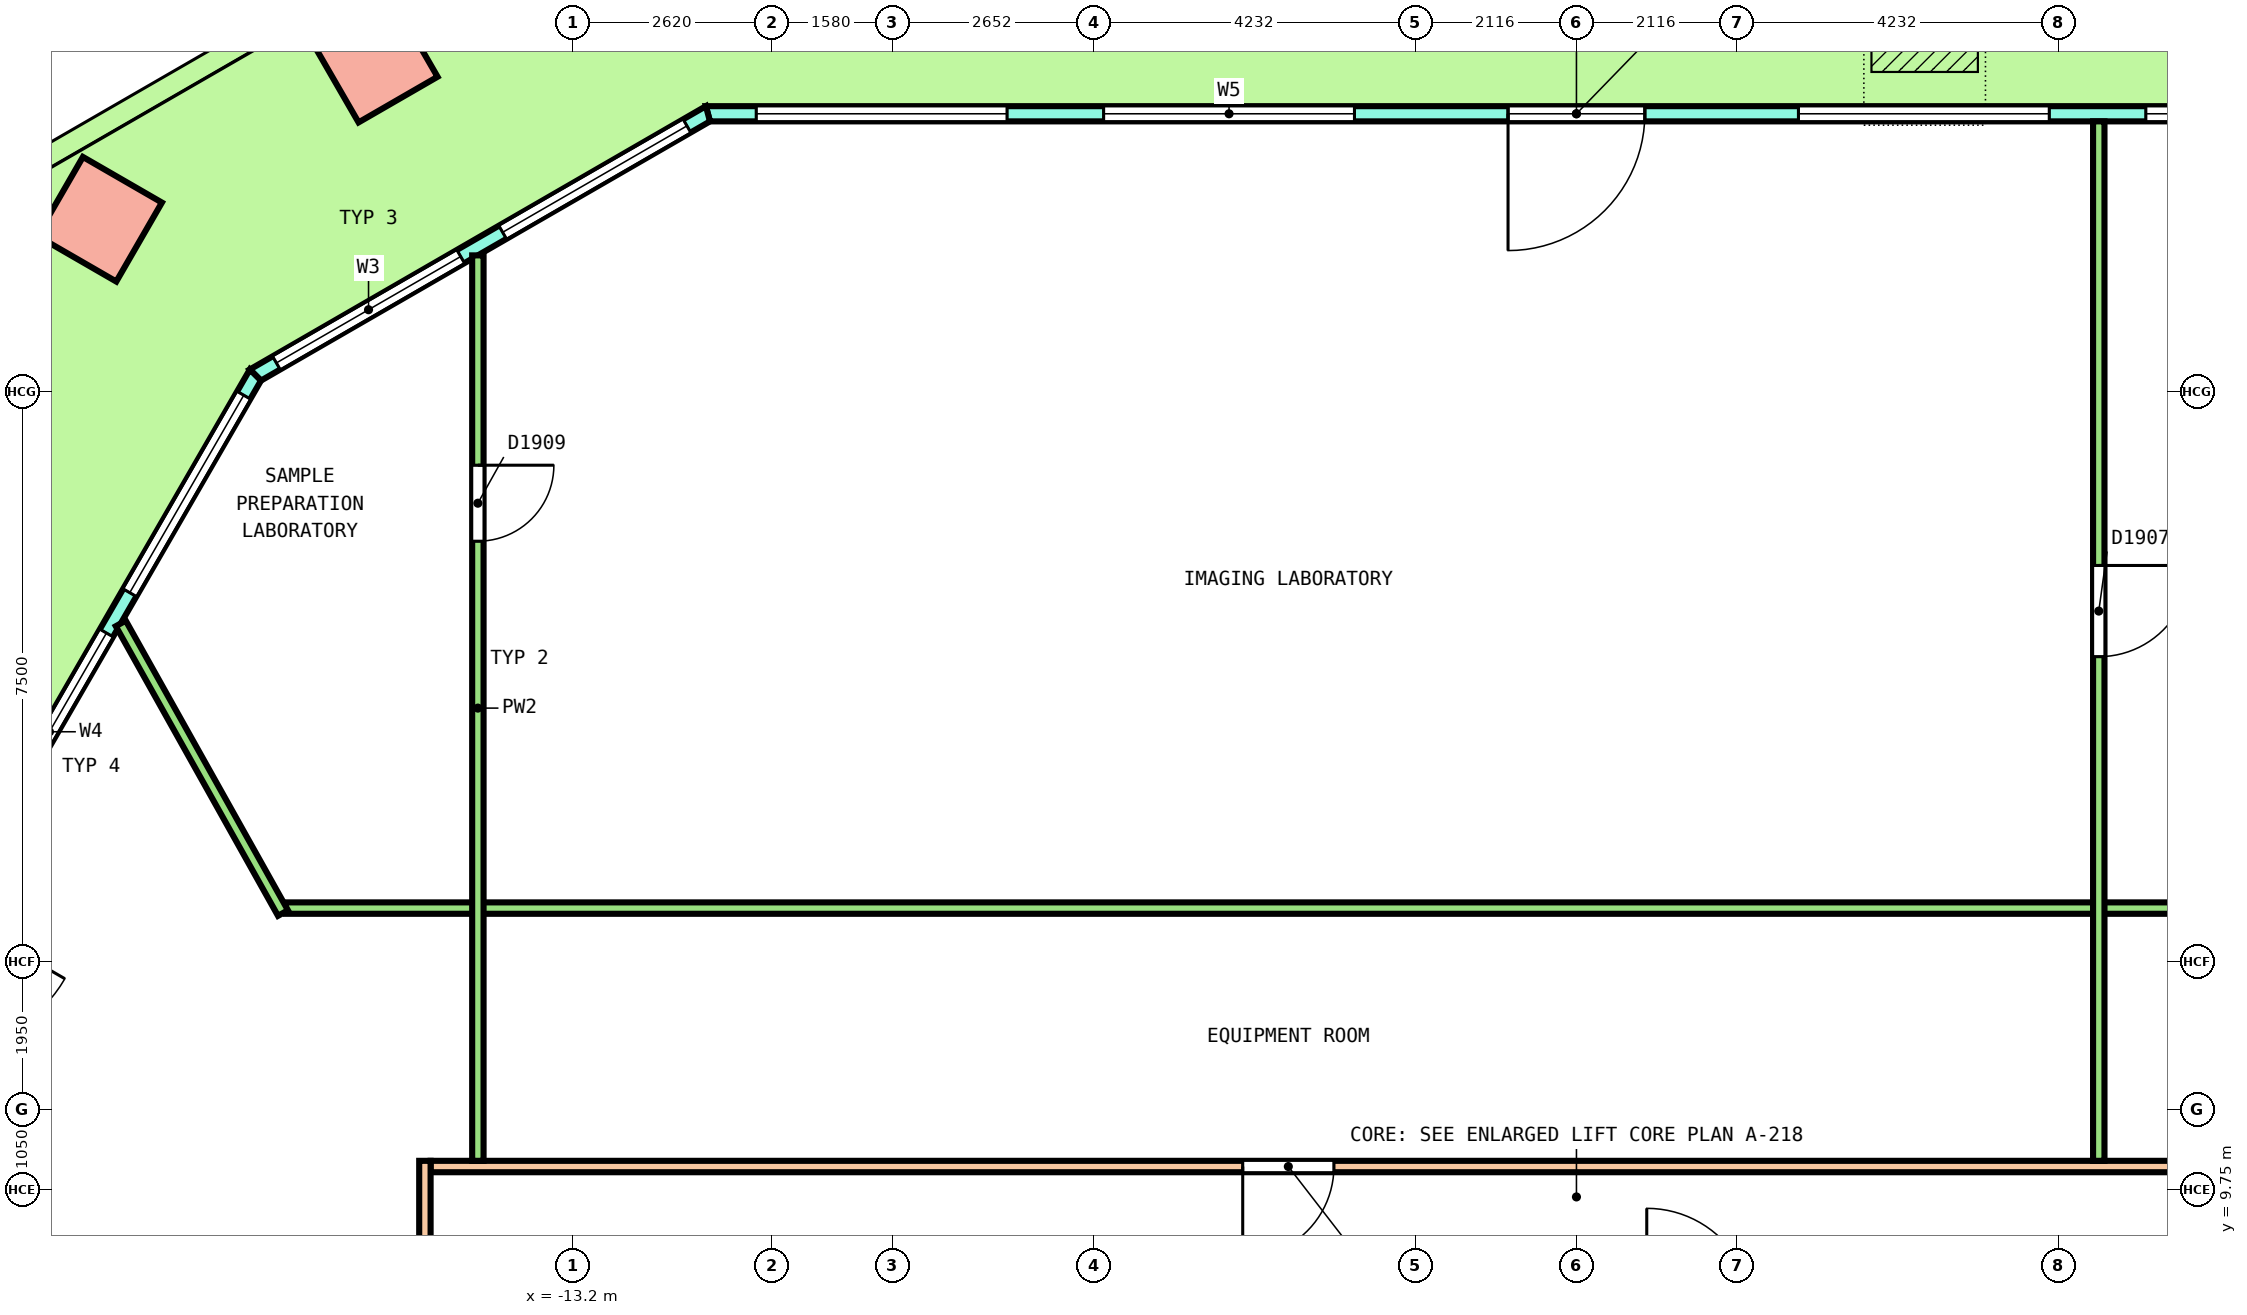
"""IFC4 building model, lengths in metres.
Left out: names, types, materials, properties, quantities, classifications, styles, units other than length and angle.
Written with IfcOpenShell. Run it as: python <this file> out.ifc"""

import sys

from ifc_helpers import new_model, si_unit, direction, frame, frame_2d, origin, origin_2d, place, context, subcontext, project, spatial, polyline, rectangle, outline, extrude, element, fill, save


model = new_model("IFC4")
c1 = context("Model", 3, precision=1e-05, world=origin(), true_north=direction((0.0, 1.0)))
c2 = subcontext(c1, "Body", "Model", "MODEL_VIEW")
j1 = project(units=[si_unit("LENGTHUNIT", "METRE"), si_unit("PLANEANGLEUNIT", "RADIAN")], contexts=[c1])
p1 = place(None, origin())
s1 = spatial("IfcSite", under=j1, at=p1, CompositionType="ELEMENT")
p2 = place(p1, origin())
s2 = spatial("IfcBuilding", under=s1, at=p2, CompositionType="ELEMENT")
p3 = place(p2, frame((0.0, 0.0, 193.6)))
s3 = spatial("IfcBuildingStorey", under=s2, at=p3, CompositionType="ELEMENT", Elevation=193.6)
for number, where, z_axis, x_axis in (
    (1, (-15.803, 24.606, 0.0), (0.0, 0.0, 1.0), (-0.866, -0.5, 0.0)),
    (2, (-19.43, 22.512, 0.0), (0.0, 0.0, 1.0), (-0.5, -0.866, 0.0)),
):
    element("IfcColumn", number, at=place(p3, frame(where, z_axis=z_axis, x_axis=x_axis)), inside=s3, PredefinedType="COLUMN", context=c2, shape_type="SweptSolid", body=[
        extrude(rectangle(XDim=1.2, YDim=1.2, at=origin_2d()), origin(), (0.0, 0.0, 1.0), 4.04),
    ])
p4 = place(p3, frame((11.426, 23.9, 0.0), z_axis=(0.0, 0.0, 1.0), x_axis=(-1.0, 0.0, 0.0)))
e3 = element("IfcWall", 3, at=p4, inside=s3, PredefinedType="SOLIDWALL", context=c2, shape_type="SweptSolid", body=[
    extrude(outline(polyline([(-0.027, -0.1), (1.014, -0.1), (2.055, -0.1), (3.097, -0.1), (4.138, -0.1), (5.179, -0.1), (6.22, -0.1), (7.261, -0.1), (8.303, -0.1), (9.344, -0.1), (10.385, -0.1), (11.426, -0.1), (12.468, -0.1), (13.509, -0.1), (14.55, -0.1), (15.591, -0.1), (16.632, -0.1), (17.673, -0.1), (18.715, -0.1), (19.756, -0.1), (20.797, -0.1), (21.838, -0.1), (22.879, -0.1), (22.826, 0.1), (21.789, 0.1), (20.753, 0.1), (19.717, 0.1), (18.68, 0.1), (17.644, 0.1), (16.608, 0.1), (15.572, 0.1), (14.535, 0.1), (13.499, 0.1), (12.463, 0.1), (11.426, 0.1), (10.39, 0.1), (9.354, 0.1), (8.317, 0.1), (7.281, 0.1), (6.245, 0.1), (5.208, 0.1), (4.172, 0.1), (3.136, 0.1), (2.099, 0.1), (1.063, 0.1), (0.027, 0.1), (-0.027, -0.1)])), origin(), (0.0, 0.0, 1.0), 4.1),
])
p5 = place(p4, frame((0.635, 0.0, 0.1)))
e4 = element("IfcOpeningElement", 4, at=p5, cuts=e3, PredefinedType="OPENING", context=c2, shape_type="SweptSolid", body=[
    extrude(rectangle(XDim=3.3, YDim=2.9, at=frame_2d((1.65, 1.45))), frame((0.0, 0.11, 0.0), z_axis=(0.0, -1.0, 0.0), x_axis=(1.0, 0.0, 0.0)), (0.0, 0.0, 1.0), 0.22),
])
p6 = place(p4, frame((5.206, 0.0, 0.1)))
e5 = element("IfcOpeningElement", 5, at=p6, cuts=e3, PredefinedType="OPENING", context=c2, shape_type="SweptSolid", body=[
    extrude(rectangle(XDim=3.3, YDim=2.9, at=frame_2d((1.65, 1.45))), frame((0.0, 0.11, 0.0), z_axis=(0.0, -1.0, 0.0), x_axis=(1.0, 0.0, 0.0)), (0.0, 0.0, 1.0), 0.22),
])
p7 = place(p4, frame((10.526, 0.0, 0.0)))
e6 = element("IfcOpeningElement", 6, at=p7, cuts=e3, PredefinedType="OPENING", context=c2, shape_type="SweptSolid", body=[
    extrude(rectangle(XDim=1.8, YDim=2.4, at=frame_2d((0.9, 1.2))), frame((0.0, 0.11, 0.0), z_axis=(0.0, -1.0, 0.0), x_axis=(1.0, 0.0, 0.0)), (0.0, 0.0, 1.0), 0.22),
])
p8 = place(p4, frame((10.526, 0.0, 2.55)))
e7 = element("IfcOpeningElement", 7, at=p8, cuts=e3, PredefinedType="OPENING", context=c2, shape_type="SweptSolid", body=[
    extrude(rectangle(XDim=1.8, YDim=0.45, at=frame_2d((0.9, 0.225))), frame((0.0, 0.11, 0.0), z_axis=(0.0, -1.0, 0.0), x_axis=(1.0, 0.0, 0.0)), (0.0, 0.0, 1.0), 0.22),
])
p9 = place(p4, frame((14.347, 0.0, 0.1)))
e8 = element("IfcOpeningElement", 8, at=p9, cuts=e3, PredefinedType="OPENING", context=c2, shape_type="SweptSolid", body=[
    extrude(rectangle(XDim=3.3, YDim=2.9, at=frame_2d((1.65, 1.45))), frame((0.0, 0.11, 0.0), z_axis=(0.0, -1.0, 0.0), x_axis=(1.0, 0.0, 0.0)), (0.0, 0.0, 1.0), 0.22),
])
p10 = place(p4, frame((18.917, 0.0, 0.1)))
e9 = element("IfcOpeningElement", 9, at=p10, cuts=e3, PredefinedType="OPENING", context=c2, shape_type="SweptSolid", body=[
    extrude(rectangle(XDim=3.3, YDim=2.9, at=frame_2d((1.65, 1.45))), frame((0.0, 0.11, 0.0), z_axis=(0.0, -1.0, 0.0), x_axis=(1.0, 0.0, 0.0)), (0.0, 0.0, 1.0), 0.22),
])
p11 = place(p3, frame((-11.426, 23.9, 0.0), z_axis=(0.0, 0.0, 1.0), x_axis=(-0.866029458321, -0.49999297727, 0.0)))
e10 = element("IfcWall", 10, at=p11, inside=s3, PredefinedType="SOLIDWALL", context=c2, shape_type="SweptSolid", body=[
    extrude(outline(polyline([(-0.027, -0.1), (1.128, -0.1), (2.282, -0.1), (3.437, -0.1), (4.592, -0.1), (5.747, -0.1), (6.901, -0.1), (6.848, 0.1), (5.711, 0.1), (4.574, 0.1), (3.437, 0.1), (2.301, 0.1), (1.164, 0.1), (0.027, 0.1), (-0.027, -0.1)])), origin(), (0.0, 0.0, 1.0), 4.1),
])
p12 = place(p11, frame((0.319, 0.0, 0.1)))
e11 = element("IfcOpeningElement", 11, at=p12, cuts=e10, PredefinedType="OPENING", context=c2, shape_type="SweptSolid", body=[
    extrude(rectangle(XDim=2.8, YDim=2.9, at=frame_2d((1.4, 1.45))), frame((0.0, 0.11, 0.0), z_axis=(0.0, -1.0, 0.0), x_axis=(1.0, 0.0, 0.0)), (0.0, 0.0, 1.0), 0.22),
])
p13 = place(p11, frame((3.756, 0.0, 0.1)))
e12 = element("IfcOpeningElement", 12, at=p13, cuts=e10, PredefinedType="OPENING", context=c2, shape_type="SweptSolid", body=[
    extrude(rectangle(XDim=2.8, YDim=2.9, at=frame_2d((1.4, 1.45))), frame((0.0, 0.11, 0.0), z_axis=(0.0, -1.0, 0.0), x_axis=(1.0, 0.0, 0.0)), (0.0, 0.0, 1.0), 0.22),
])
p14 = place(p3, frame((-17.38, 20.463, 0.0), z_axis=(0.0, 0.0, 1.0), x_axis=(-0.500000137386, -0.866025324465, 0.0)))
e13 = element("IfcWall", 13, at=p14, inside=s3, PredefinedType="SOLIDWALL", context=c2, shape_type="SweptSolid", body=[
    extrude(outline(polyline([(-0.027, -0.1), (0.979, -0.1), (1.986, -0.1), (2.992, -0.1), (3.999, -0.1), (5.005, -0.1), (6.012, -0.1), (7.018, -0.1), (8.025, -0.1), (9.031, -0.1), (10.038, -0.1), (11.044, -0.1), (12.051, -0.1), (13.057, -0.1), (14.063, -0.1), (15.07, -0.1), (16.076, -0.1), (17.083, -0.1), (18.089, -0.1), (18.036, 0.1), (17.035, 0.1), (16.035, 0.1), (15.034, 0.1), (14.034, 0.1), (13.033, 0.1), (12.033, 0.1), (11.032, 0.1), (10.032, 0.1), (9.031, 0.1), (8.031, 0.1), (7.03, 0.1), (6.03, 0.1), (5.029, 0.1), (4.029, 0.1), (3.028, 0.1), (2.028, 0.1), (1.027, 0.1), (0.027, 0.1), (-0.027, -0.1)])), origin(), (0.0, 0.0, 1.0), 4.1),
])
p15 = place(p14, frame((0.306, 0.0, 0.1)))
e14 = element("IfcOpeningElement", 14, at=p15, cuts=e13, PredefinedType="OPENING", context=c2, shape_type="SweptSolid", body=[
    extrude(rectangle(XDim=3.0, YDim=2.9, at=frame_2d((1.5, 1.45))), frame((0.0, 0.11, 0.0), z_axis=(0.0, -1.0, 0.0), x_axis=(1.0, 0.0, 0.0)), (0.0, 0.0, 1.0), 0.22),
])
p16 = place(p14, frame((3.919, 0.0, 0.1)))
e15 = element("IfcOpeningElement", 15, at=p16, cuts=e13, PredefinedType="OPENING", context=c2, shape_type="SweptSolid", body=[
    extrude(rectangle(XDim=3.0, YDim=2.9, at=frame_2d((1.5, 1.45))), frame((0.0, 0.11, 0.0), z_axis=(0.0, -1.0, 0.0), x_axis=(1.0, 0.0, 0.0)), (0.0, 0.0, 1.0), 0.22),
])
p17 = place(p14, frame((8.131, 0.0, 0.0)))
e16 = element("IfcOpeningElement", 16, at=p17, cuts=e13, PredefinedType="OPENING", context=c2, shape_type="SweptSolid", body=[
    extrude(rectangle(XDim=1.8, YDim=2.4, at=frame_2d((0.9, 1.2))), frame((0.0, 0.11, 0.0), z_axis=(0.0, -1.0, 0.0), x_axis=(1.0, 0.0, 0.0)), (0.0, 0.0, 1.0), 0.22),
])
p18 = place(p14, frame((8.131, 0.0, 2.55)))
e17 = element("IfcOpeningElement", 17, at=p18, cuts=e13, PredefinedType="OPENING", context=c2, shape_type="SweptSolid", body=[
    extrude(rectangle(XDim=1.8, YDim=0.45, at=frame_2d((0.9, 0.225))), frame((0.0, 0.11, 0.0), z_axis=(0.0, -1.0, 0.0), x_axis=(1.0, 0.0, 0.0)), (0.0, 0.0, 1.0), 0.22),
])
p19 = place(p14, frame((11.144, 0.0, 0.1)))
e18 = element("IfcOpeningElement", 18, at=p19, cuts=e13, PredefinedType="OPENING", context=c2, shape_type="SweptSolid", body=[
    extrude(rectangle(XDim=3.0, YDim=2.9, at=frame_2d((1.5, 1.45))), frame((0.0, 0.11, 0.0), z_axis=(0.0, -1.0, 0.0), x_axis=(1.0, 0.0, 0.0)), (0.0, 0.0, 1.0), 0.22),
])
p20 = place(p14, frame((14.756, 0.0, 0.1)))
e19 = element("IfcOpeningElement", 19, at=p20, cuts=e13, PredefinedType="OPENING", context=c2, shape_type="SweptSolid", body=[
    extrude(rectangle(XDim=3.0, YDim=2.9, at=frame_2d((1.5, 1.45))), frame((0.0, 0.11, 0.0), z_axis=(0.0, -1.0, 0.0), x_axis=(1.0, 0.0, 0.0)), (0.0, 0.0, 1.0), 0.22),
])
p21 = place(p3, frame((-15.075, 10.05, 0.0), z_axis=(0.0, 0.0, 1.0), x_axis=(1.0, 0.0, 0.0)))
e20 = element("IfcWall", 20, at=p21, inside=s3, PredefinedType="PARTITIONING", context=c2, shape_type="SweptSolid", body=[
    extrude(rectangle(XDim=30.15, YDim=0.15, at=frame_2d((15.075, 0.0))), origin(), (0.0, 0.0, 1.0), 3.05),
])
p22 = place(p21, frame((26.573, 0.0, 0.0)))
e21 = element("IfcOpeningElement", 21, at=p22, cuts=e20, PredefinedType="OPENING", context=c2, shape_type="SweptSolid", body=[
    extrude(rectangle(XDim=1.0, YDim=2.1, at=frame_2d((0.5, 1.05))), frame((0.0, 0.085, 0.0), z_axis=(0.0, -1.0, 0.0), x_axis=(1.0, 0.0, 0.0)), (0.0, 0.0, 1.0), 0.17),
])
p23 = place(p21, frame((10.684, 0.0, 0.0)))
e22 = element("IfcOpeningElement", 22, at=p23, cuts=e20, PredefinedType="OPENING", context=c2, shape_type="SweptSolid", body=[
    extrude(rectangle(XDim=1.2, YDim=2.1, at=frame_2d((0.6, 1.05))), frame((0.0, 0.085, 0.0), z_axis=(0.0, -1.0, 0.0), x_axis=(1.0, 0.0, 0.0)), (0.0, 0.0, 1.0), 0.17),
])
p24 = place(p3, frame((-15.15, 0.576, 0.0), z_axis=(0.0, 0.0, 1.0), x_axis=(0.0, 1.0, 0.0)))
e23 = element("IfcWall", 23, at=p24, inside=s3, PredefinedType="PARTITIONING", context=c2, shape_type="SweptSolid", body=[
    extrude(rectangle(XDim=9.549, YDim=0.15, at=frame_2d((4.775, 0.0))), origin(), (0.0, 0.0, 1.0), 3.05),
])
p25 = place(p3, frame((-16.979, 13.45, 0.0), z_axis=(0.0, 0.0, 1.0), x_axis=(1.0, 0.0, 0.0)))
e24 = element("IfcWall", 24, at=p25, inside=s3, PredefinedType="PARTITIONING", context=c2, shape_type="SweptSolid", body=[
    extrude(rectangle(XDim=35.454, YDim=0.15, at=frame_2d((17.727, 0.0))), origin(), (0.0, 0.0, 1.0), 3.05),
])
p26 = place(p25, frame((27.623, 0.0, 0.0)))
e25 = element("IfcOpeningElement", 25, at=p26, cuts=e24, PredefinedType="OPENING", context=c2, shape_type="SweptSolid", body=[
    extrude(rectangle(XDim=1.2, YDim=2.1, at=frame_2d((0.6, 1.05))), frame((0.0, 0.085, 0.0), z_axis=(0.0, -1.0, 0.0), x_axis=(1.0, 0.0, 0.0)), (0.0, 0.0, 1.0), 0.17),
])
p27 = place(p3, frame((6.872, 10.125, 0.0), z_axis=(0.0, 0.0, 1.0), x_axis=(0.0, 1.0, 0.0)))
e26 = element("IfcWall", 26, at=p27, inside=s3, PredefinedType="PARTITIONING", context=c2, shape_type="SweptSolid", body=[
    extrude(rectangle(XDim=13.675, YDim=0.15, at=frame_2d((6.837, 0.0))), origin(), (0.0, 0.0, 1.0), 3.05),
])
p28 = place(p27, frame((6.633, 0.0, 0.0)))
e27 = element("IfcOpeningElement", 27, at=p28, cuts=e26, PredefinedType="OPENING", context=c2, shape_type="SweptSolid", body=[
    extrude(rectangle(XDim=1.2, YDim=2.1, at=frame_2d((0.6, 1.05))), frame((0.0, 0.085, 0.0), z_axis=(0.0, -1.0, 0.0), x_axis=(1.0, 0.0, 0.0)), (0.0, 0.0, 1.0), 0.17),
])
p29 = place(p3, frame((-14.453, 10.125, 0.0), z_axis=(0.0, 0.0, 1.0), x_axis=(0.0, 1.0, 0.0)))
e28 = element("IfcWall", 28, at=p29, inside=s3, PredefinedType="PARTITIONING", context=c2, shape_type="SweptSolid", body=[
    extrude(rectangle(XDim=11.912, YDim=0.15, at=frame_2d((5.956, 0.0))), origin(), (0.0, 0.0, 1.0), 3.05),
])
p30 = place(p29, frame((8.152, 0.0, 0.0)))
e29 = element("IfcOpeningElement", 29, at=p30, cuts=e28, PredefinedType="OPENING", context=c2, shape_type="SweptSolid", body=[
    extrude(rectangle(XDim=1.0, YDim=2.1, at=frame_2d((0.5, 1.05))), frame((0.0, 0.085, 0.0), z_axis=(0.0, -1.0, 0.0), x_axis=(1.0, 0.0, 0.0)), (0.0, 0.0, 1.0), 0.17),
])
p31 = place(p3, frame((-19.151, 17.195, 0.0), z_axis=(0.0, 0.0, 1.0), x_axis=(0.48858294178, -0.872517454841, 0.0)))
e30 = element("IfcWall", 30, at=p31, inside=s3, PredefinedType="PARTITIONING", context=c2, shape_type="SweptSolid", body=[
    extrude(rectangle(XDim=4.367, YDim=0.15, at=frame_2d((2.184, 0.0))), origin(), (0.0, 0.0, 1.0), 3.05),
])
p32 = place(p5, origin())
e31 = element("IfcWindow", 31, at=p32, inside=s3, PartitioningType="SINGLE_PANEL", PredefinedType="WINDOW", context=c2, shape_type="SweptSolid", body=[
    extrude(rectangle(XDim=3.3, YDim=2.9, at=frame_2d((1.65, 1.45))), frame((0.0, 0.03, 0.0), z_axis=(0.0, -1.0, 0.0), x_axis=(1.0, 0.0, 0.0)), (0.0, 0.0, 1.0), 0.06),
])
fill(e4, e31)
p33 = place(p6, origin())
e32 = element("IfcWindow", 32, at=p33, inside=s3, PartitioningType="SINGLE_PANEL", PredefinedType="WINDOW", context=c2, shape_type="SweptSolid", body=[
    extrude(rectangle(XDim=3.3, YDim=2.9, at=frame_2d((1.65, 1.45))), frame((0.0, 0.03, 0.0), z_axis=(0.0, -1.0, 0.0), x_axis=(1.0, 0.0, 0.0)), (0.0, 0.0, 1.0), 0.06),
])
fill(e5, e32)
p34 = place(p7, origin())
e33 = element("IfcDoor", 33, at=p34, inside=s3, OperationType="DOUBLE_DOOR_SINGLE_SWING", PredefinedType="DOOR", context=c2, shape_type="SweptSolid", body=[
    extrude(rectangle(XDim=1.8, YDim=2.4, at=frame_2d((0.9, 1.2))), frame((0.0, 0.025, 0.0), z_axis=(0.0, -1.0, 0.0), x_axis=(1.0, 0.0, 0.0)), (0.0, 0.0, 1.0), 0.05),
])
fill(e6, e33)
p35 = place(p8, origin())
e34 = element("IfcWindow", 34, at=p35, inside=s3, PartitioningType="SINGLE_PANEL", PredefinedType="WINDOW", context=c2, shape_type="SweptSolid", body=[
    extrude(rectangle(XDim=1.8, YDim=0.45, at=frame_2d((0.9, 0.225))), frame((0.0, 0.03, 0.0), z_axis=(0.0, -1.0, 0.0), x_axis=(1.0, 0.0, 0.0)), (0.0, 0.0, 1.0), 0.06),
])
fill(e7, e34)
p36 = place(p9, origin())
e35 = element("IfcWindow", 35, at=p36, inside=s3, PartitioningType="SINGLE_PANEL", PredefinedType="WINDOW", context=c2, shape_type="SweptSolid", body=[
    extrude(rectangle(XDim=3.3, YDim=2.9, at=frame_2d((1.65, 1.45))), frame((0.0, 0.03, 0.0), z_axis=(0.0, -1.0, 0.0), x_axis=(1.0, 0.0, 0.0)), (0.0, 0.0, 1.0), 0.06),
])
fill(e8, e35)
p37 = place(p10, origin())
e36 = element("IfcWindow", 36, at=p37, inside=s3, PartitioningType="SINGLE_PANEL", PredefinedType="WINDOW", context=c2, shape_type="SweptSolid", body=[
    extrude(rectangle(XDim=3.3, YDim=2.9, at=frame_2d((1.65, 1.45))), frame((0.0, 0.03, 0.0), z_axis=(0.0, -1.0, 0.0), x_axis=(1.0, 0.0, 0.0)), (0.0, 0.0, 1.0), 0.06),
])
fill(e9, e36)
p38 = place(p12, origin())
e37 = element("IfcWindow", 37, at=p38, inside=s3, PartitioningType="SINGLE_PANEL", PredefinedType="WINDOW", context=c2, shape_type="SweptSolid", body=[
    extrude(rectangle(XDim=2.8, YDim=2.9, at=frame_2d((1.4, 1.45))), frame((0.0, 0.03, 0.0), z_axis=(0.0, -1.0, 0.0), x_axis=(1.0, 0.0, 0.0)), (0.0, 0.0, 1.0), 0.06),
])
fill(e11, e37)
p39 = place(p13, origin())
e38 = element("IfcWindow", 38, at=p39, inside=s3, PartitioningType="SINGLE_PANEL", PredefinedType="WINDOW", context=c2, shape_type="SweptSolid", body=[
    extrude(rectangle(XDim=2.8, YDim=2.9, at=frame_2d((1.4, 1.45))), frame((0.0, 0.03, 0.0), z_axis=(0.0, -1.0, 0.0), x_axis=(1.0, 0.0, 0.0)), (0.0, 0.0, 1.0), 0.06),
])
fill(e12, e38)
p40 = place(p15, origin())
e39 = element("IfcWindow", 39, at=p40, inside=s3, PartitioningType="SINGLE_PANEL", PredefinedType="WINDOW", context=c2, shape_type="SweptSolid", body=[
    extrude(rectangle(XDim=3.0, YDim=2.9, at=frame_2d((1.5, 1.45))), frame((0.0, 0.03, 0.0), z_axis=(0.0, -1.0, 0.0), x_axis=(1.0, 0.0, 0.0)), (0.0, 0.0, 1.0), 0.06),
])
fill(e14, e39)
p41 = place(p16, origin())
e40 = element("IfcWindow", 40, at=p41, inside=s3, PartitioningType="SINGLE_PANEL", PredefinedType="WINDOW", context=c2, shape_type="SweptSolid", body=[
    extrude(rectangle(XDim=3.0, YDim=2.9, at=frame_2d((1.5, 1.45))), frame((0.0, 0.03, 0.0), z_axis=(0.0, -1.0, 0.0), x_axis=(1.0, 0.0, 0.0)), (0.0, 0.0, 1.0), 0.06),
])
fill(e15, e40)
p42 = place(p28, origin())
e41 = element("IfcDoor", 41, at=p42, inside=s3, OperationType="DOUBLE_DOOR_SINGLE_SWING", PredefinedType="DOOR", context=c2, shape_type="SweptSolid", body=[
    extrude(rectangle(XDim=1.2, YDim=2.1, at=frame_2d((0.6, 1.05))), frame((0.0, 0.025, 0.0), z_axis=(0.0, -1.0, 0.0), x_axis=(1.0, 0.0, 0.0)), (0.0, 0.0, 1.0), 0.05),
])
fill(e27, e41)
p43 = place(p23, origin())
e42 = element("IfcDoor", 42, at=p43, inside=s3, OperationType="DOUBLE_DOOR_SINGLE_SWING", PredefinedType="DOOR", context=c2, shape_type="SweptSolid", body=[
    extrude(rectangle(XDim=1.2, YDim=2.1, at=frame_2d((0.6, 1.05))), frame((0.0, 0.025, 0.0), z_axis=(0.0, -1.0, 0.0), x_axis=(1.0, 0.0, 0.0)), (0.0, 0.0, 1.0), 0.05),
])
fill(e22, e42)
p44 = place(p30, origin())
e43 = element("IfcDoor", 43, at=p44, inside=s3, OperationType="SINGLE_SWING_LEFT", PredefinedType="DOOR", context=c2, shape_type="SweptSolid", body=[
    extrude(rectangle(XDim=1.0, YDim=2.1, at=frame_2d((0.5, 1.05))), frame((0.0, 0.025, 0.0), z_axis=(0.0, -1.0, 0.0), x_axis=(1.0, 0.0, 0.0)), (0.0, 0.0, 1.0), 0.05),
])
fill(e29, e43)
save(model, sys.argv[1])
